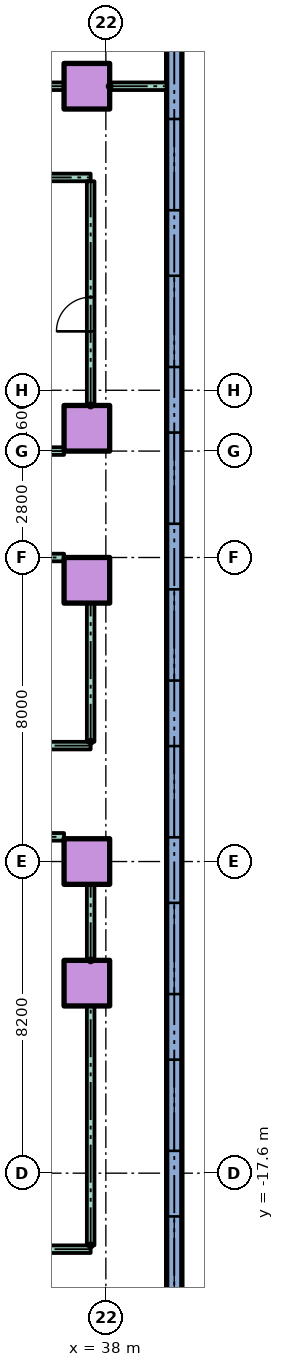
"""IFC4 building model, lengths in metres.
Left out: names, types, materials, properties, quantities, classifications, styles, units other than length and angle.
Written with IfcOpenShell. Run it as: python <this file> out.ifc"""

import sys

from ifc_helpers import new_model, si_unit, direction, frame, frame_2d, origin, origin_2d, place, context, subcontext, project, spatial, rectangle, hollow_rectangle, extrude, element, fill, save


model = new_model("IFC4")
c1 = context("Model", 3, precision=1e-05, world=origin(), true_north=direction((0.0, 1.0)))
c2 = subcontext(c1, "Body", "Model", "MODEL_VIEW")
j1 = project(units=[si_unit("LENGTHUNIT", "METRE"), si_unit("PLANEANGLEUNIT", "RADIAN")], contexts=[c1])
p1 = place(None, origin())
s1 = spatial("IfcSite", under=j1, at=p1, CompositionType="ELEMENT")
p2 = place(p1, origin())
s2 = spatial("IfcBuilding", under=s1, at=p2, CompositionType="ELEMENT")
p3 = place(p2, frame((0.0, 0.0, 18.0)))
s3 = spatial("IfcBuildingStorey", under=s2, at=p3, CompositionType="ELEMENT", Elevation=18.0)
for number, where in (
    (1, (37.5, -12.6, 0.0)),
    (2, (37.5, -9.4, 0.0)),
    (3, (37.5, -2.0, 0.0)),
    (4, (37.5, 2.0, 0.0)),
    (5, (37.5, 11.0, 0.0)),
):
    element("IfcColumn", number, at=place(p3, frame(where)), inside=s3, PredefinedType="COLUMN", context=c2, shape_type="SweptSolid", body=[
        extrude(hollow_rectangle(XDim=1.2, YDim=1.2, WallThickness=0.06, at=origin_2d()), origin(), (0.0, 0.0, 1.0), 4.0),
    ])
p4 = place(p3, frame((39.8, -50.0, 0.0), z_axis=(0.0, 0.0, 1.0), x_axis=(0.0, 1.0, 0.0)))
e6 = element("IfcWall", 6, at=p4, inside=s3, PredefinedType="STANDARD", context=c2, shape_type="SweptSolid", body=[
    extrude(rectangle(XDim=70.0, YDim=0.4, at=frame_2d((35.0, 0.0))), origin(), (0.0, 0.0, 1.0), 3.7),
])
p5 = place(p4, frame((0.75, 0.0, 0.9)))
e7 = element("IfcOpeningElement", 7, at=p5, cuts=e6, PredefinedType="OPENING", context=c2, shape_type="SweptSolid", body=[
    extrude(rectangle(XDim=2.4, YDim=2.1, at=frame_2d((1.2, 1.05))), frame((0.0, 0.21, 0.0), z_axis=(0.0, -1.0, 0.0), x_axis=(1.0, 0.0, 0.0)), (0.0, 0.0, 1.0), 0.42),
])
p6 = place(p4, frame((6.55, 0.0, 0.9)))
e8 = element("IfcOpeningElement", 8, at=p6, cuts=e6, PredefinedType="OPENING", context=c2, shape_type="SweptSolid", body=[
    extrude(rectangle(XDim=2.4, YDim=2.1, at=frame_2d((1.2, 1.05))), frame((0.0, 0.21, 0.0), z_axis=(0.0, -1.0, 0.0), x_axis=(1.0, 0.0, 0.0)), (0.0, 0.0, 1.0), 0.42),
])
p7 = place(p4, frame((10.05, 0.0, 0.9)))
e9 = element("IfcOpeningElement", 9, at=p7, cuts=e6, PredefinedType="OPENING", context=c2, shape_type="SweptSolid", body=[
    extrude(rectangle(XDim=2.4, YDim=2.1, at=frame_2d((1.2, 1.05))), frame((0.0, 0.21, 0.0), z_axis=(0.0, -1.0, 0.0), x_axis=(1.0, 0.0, 0.0)), (0.0, 0.0, 1.0), 0.42),
])
p8 = place(p4, frame((13.55, 0.0, 0.9)))
e10 = element("IfcOpeningElement", 10, at=p8, cuts=e6, PredefinedType="OPENING", context=c2, shape_type="SweptSolid", body=[
    extrude(rectangle(XDim=2.4, YDim=2.1, at=frame_2d((1.2, 1.05))), frame((0.0, 0.21, 0.0), z_axis=(0.0, -1.0, 0.0), x_axis=(1.0, 0.0, 0.0)), (0.0, 0.0, 1.0), 0.42),
])
p9 = place(p4, frame((28.863, 0.0, 0.9)))
e11 = element("IfcOpeningElement", 11, at=p9, cuts=e6, PredefinedType="OPENING", context=c2, shape_type="SweptSolid", body=[
    extrude(rectangle(XDim=2.4, YDim=2.1, at=frame_2d((1.2, 1.05))), frame((0.0, 0.21, 0.0), z_axis=(0.0, -1.0, 0.0), x_axis=(1.0, 0.0, 0.0)), (0.0, 0.0, 1.0), 0.42),
])
p10 = place(p4, frame((32.988, 0.0, 0.9)))
e12 = element("IfcOpeningElement", 12, at=p10, cuts=e6, PredefinedType="OPENING", context=c2, shape_type="SweptSolid", body=[
    extrude(rectangle(XDim=2.4, YDim=2.1, at=frame_2d((1.2, 1.05))), frame((0.0, 0.21, 0.0), z_axis=(0.0, -1.0, 0.0), x_axis=(1.0, 0.0, 0.0)), (0.0, 0.0, 1.0), 0.42),
])
p11 = place(p4, frame((37.113, 0.0, 0.9)))
e13 = element("IfcOpeningElement", 13, at=p11, cuts=e6, PredefinedType="OPENING", context=c2, shape_type="SweptSolid", body=[
    extrude(rectangle(XDim=2.4, YDim=2.1, at=frame_2d((1.2, 1.05))), frame((0.0, 0.21, 0.0), z_axis=(0.0, -1.0, 0.0), x_axis=(1.0, 0.0, 0.0)), (0.0, 0.0, 1.0), 0.42),
])
p12 = place(p4, frame((41.238, 0.0, 0.9)))
e14 = element("IfcOpeningElement", 14, at=p12, cuts=e6, PredefinedType="OPENING", context=c2, shape_type="SweptSolid", body=[
    extrude(rectangle(XDim=2.4, YDim=2.1, at=frame_2d((1.2, 1.05))), frame((0.0, 0.21, 0.0), z_axis=(0.0, -1.0, 0.0), x_axis=(1.0, 0.0, 0.0)), (0.0, 0.0, 1.0), 0.42),
])
p13 = place(p4, frame((45.363, 0.0, 0.9)))
e15 = element("IfcOpeningElement", 15, at=p13, cuts=e6, PredefinedType="OPENING", context=c2, shape_type="SweptSolid", body=[
    extrude(rectangle(XDim=2.4, YDim=2.1, at=frame_2d((1.2, 1.05))), frame((0.0, 0.21, 0.0), z_axis=(0.0, -1.0, 0.0), x_axis=(1.0, 0.0, 0.0)), (0.0, 0.0, 1.0), 0.42),
])
p14 = place(p4, frame((49.488, 0.0, 0.9)))
e16 = element("IfcOpeningElement", 16, at=p14, cuts=e6, PredefinedType="OPENING", context=c2, shape_type="SweptSolid", body=[
    extrude(rectangle(XDim=2.4, YDim=2.1, at=frame_2d((1.2, 1.05))), frame((0.0, 0.21, 0.0), z_axis=(0.0, -1.0, 0.0), x_axis=(1.0, 0.0, 0.0)), (0.0, 0.0, 1.0), 0.42),
])
p15 = place(p4, frame((53.613, 0.0, 0.9)))
e17 = element("IfcOpeningElement", 17, at=p15, cuts=e6, PredefinedType="OPENING", context=c2, shape_type="SweptSolid", body=[
    extrude(rectangle(XDim=2.4, YDim=2.1, at=frame_2d((1.2, 1.05))), frame((0.0, 0.21, 0.0), z_axis=(0.0, -1.0, 0.0), x_axis=(1.0, 0.0, 0.0)), (0.0, 0.0, 1.0), 0.42),
])
p16 = place(p4, frame((57.738, 0.0, 0.9)))
e18 = element("IfcOpeningElement", 18, at=p16, cuts=e6, PredefinedType="OPENING", context=c2, shape_type="SweptSolid", body=[
    extrude(rectangle(XDim=2.4, YDim=2.1, at=frame_2d((1.2, 1.05))), frame((0.0, 0.21, 0.0), z_axis=(0.0, -1.0, 0.0), x_axis=(1.0, 0.0, 0.0)), (0.0, 0.0, 1.0), 0.42),
])
p17 = place(p4, frame((62.05, 0.0, 0.9)))
e19 = element("IfcOpeningElement", 19, at=p17, cuts=e6, PredefinedType="OPENING", context=c2, shape_type="SweptSolid", body=[
    extrude(rectangle(XDim=2.4, YDim=2.1, at=frame_2d((1.2, 1.05))), frame((0.0, 0.21, 0.0), z_axis=(0.0, -1.0, 0.0), x_axis=(1.0, 0.0, 0.0)), (0.0, 0.0, 1.0), 0.42),
])
p18 = place(p4, frame((66.55, 0.0, 0.9)))
e20 = element("IfcOpeningElement", 20, at=p18, cuts=e6, PredefinedType="OPENING", context=c2, shape_type="SweptSolid", body=[
    extrude(rectangle(XDim=2.4, YDim=2.1, at=frame_2d((1.2, 1.05))), frame((0.0, 0.21, 0.0), z_axis=(0.0, -1.0, 0.0), x_axis=(1.0, 0.0, 0.0)), (0.0, 0.0, 1.0), 0.42),
])
p19 = place(p3, frame((-37.6, -19.6, 0.0)))
e21 = element("IfcWall", 21, at=p19, inside=s3, PredefinedType="PARTITIONING", context=c2, shape_type="SweptSolid", body=[
    extrude(rectangle(XDim=75.2, YDim=0.2, at=frame_2d((37.6, 0.0))), origin(), (0.0, 0.0, 1.0), 3.7),
])
p20 = place(p19, frame((2.58, 0.0, 0.0)))
e22 = element("IfcOpeningElement", 22, at=p20, cuts=e21, PredefinedType="OPENING", context=c2, shape_type="SweptSolid", body=[
    extrude(rectangle(XDim=1.0, YDim=2.1, at=frame_2d((0.5, 1.05))), frame((0.0, 0.11, 0.0), z_axis=(0.0, -1.0, 0.0), x_axis=(1.0, 0.0, 0.0)), (0.0, 0.0, 1.0), 0.22),
])
p21 = place(p19, frame((10.42, 0.0, 0.0)))
e23 = element("IfcOpeningElement", 23, at=p21, cuts=e21, PredefinedType="OPENING", context=c2, shape_type="SweptSolid", body=[
    extrude(rectangle(XDim=1.0, YDim=2.1, at=frame_2d((0.5, 1.05))), frame((0.0, 0.11, 0.0), z_axis=(0.0, -1.0, 0.0), x_axis=(1.0, 0.0, 0.0)), (0.0, 0.0, 1.0), 0.22),
])
p22 = place(p19, frame((16.58, 0.0, 0.0)))
e24 = element("IfcOpeningElement", 24, at=p22, cuts=e21, PredefinedType="OPENING", context=c2, shape_type="SweptSolid", body=[
    extrude(rectangle(XDim=1.0, YDim=2.1, at=frame_2d((0.5, 1.05))), frame((0.0, 0.11, 0.0), z_axis=(0.0, -1.0, 0.0), x_axis=(1.0, 0.0, 0.0)), (0.0, 0.0, 1.0), 0.22),
])
p23 = place(p19, frame((24.42, 0.0, 0.0)))
e25 = element("IfcOpeningElement", 25, at=p23, cuts=e21, PredefinedType="OPENING", context=c2, shape_type="SweptSolid", body=[
    extrude(rectangle(XDim=1.0, YDim=2.1, at=frame_2d((0.5, 1.05))), frame((0.0, 0.11, 0.0), z_axis=(0.0, -1.0, 0.0), x_axis=(1.0, 0.0, 0.0)), (0.0, 0.0, 1.0), 0.22),
])
p24 = place(p19, frame((33.0, 0.0, 0.0)))
e26 = element("IfcOpeningElement", 26, at=p24, cuts=e21, PredefinedType="OPENING", context=c2, shape_type="SweptSolid", body=[
    extrude(rectangle(XDim=1.0, YDim=2.1, at=frame_2d((0.5, 1.05))), frame((0.0, 0.11, 0.0), z_axis=(0.0, -1.0, 0.0), x_axis=(1.0, 0.0, 0.0)), (0.0, 0.0, 1.0), 0.22),
])
p25 = place(p19, frame((44.0, 0.0, 0.0)))
e27 = element("IfcOpeningElement", 27, at=p25, cuts=e21, PredefinedType="OPENING", context=c2, shape_type="SweptSolid", body=[
    extrude(rectangle(XDim=1.0, YDim=2.1, at=frame_2d((0.5, 1.05))), frame((0.0, 0.11, 0.0), z_axis=(0.0, -1.0, 0.0), x_axis=(1.0, 0.0, 0.0)), (0.0, 0.0, 1.0), 0.22),
])
p26 = place(p19, frame((55.8, 0.0, 0.0)))
e28 = element("IfcOpeningElement", 28, at=p26, cuts=e21, PredefinedType="OPENING", context=c2, shape_type="SweptSolid", body=[
    extrude(rectangle(XDim=1.0, YDim=2.1, at=frame_2d((0.5, 1.05))), frame((0.0, 0.11, 0.0), z_axis=(0.0, -1.0, 0.0), x_axis=(1.0, 0.0, 0.0)), (0.0, 0.0, 1.0), 0.22),
])
p27 = place(p19, frame((68.45, 0.0, 0.0)))
e29 = element("IfcOpeningElement", 29, at=p27, cuts=e21, PredefinedType="OPENING", context=c2, shape_type="SweptSolid", body=[
    extrude(rectangle(XDim=0.9, YDim=2.1, at=frame_2d((0.45, 1.05))), frame((0.0, 0.11, 0.0), z_axis=(0.0, -1.0, 0.0), x_axis=(1.0, 0.0, 0.0)), (0.0, 0.0, 1.0), 0.22),
])
p28 = place(p3, frame((-36.9, -8.75, 0.0)))
e30 = element("IfcWall", 30, at=p28, inside=s3, PredefinedType="PARTITIONING", context=c2, shape_type="SweptSolid", body=[
    extrude(rectangle(XDim=73.8, YDim=0.2, at=frame_2d((36.9, 0.0))), origin(), (0.0, 0.0, 1.0), 3.7),
])
p29 = place(p3, frame((-37.6, -6.35, 0.0)))
e31 = element("IfcWall", 31, at=p29, inside=s3, PredefinedType="PARTITIONING", context=c2, shape_type="SweptSolid", body=[
    extrude(rectangle(XDim=75.2, YDim=0.2, at=frame_2d((37.6, 0.0))), origin(), (0.0, 0.0, 1.0), 3.7),
])
p30 = place(p29, frame((7.5, 0.0, 0.0)))
e32 = element("IfcOpeningElement", 32, at=p30, cuts=e31, PredefinedType="OPENING", context=c2, shape_type="SweptSolid", body=[
    extrude(rectangle(XDim=1.0, YDim=2.1, at=frame_2d((0.5, 1.05))), frame((0.0, 0.11, 0.0), z_axis=(0.0, -1.0, 0.0), x_axis=(1.0, 0.0, 0.0)), (0.0, 0.0, 1.0), 0.22),
])
p31 = place(p29, frame((20.55, 0.0, 0.0)))
e33 = element("IfcOpeningElement", 33, at=p31, cuts=e31, PredefinedType="OPENING", context=c2, shape_type="SweptSolid", body=[
    extrude(rectangle(XDim=0.9, YDim=2.1, at=frame_2d((0.45, 1.05))), frame((0.0, 0.11, 0.0), z_axis=(0.0, -1.0, 0.0), x_axis=(1.0, 0.0, 0.0)), (0.0, 0.0, 1.0), 0.22),
])
p32 = place(p29, frame((30.55, 0.0, 0.0)))
e34 = element("IfcOpeningElement", 34, at=p32, cuts=e31, PredefinedType="OPENING", context=c2, shape_type="SweptSolid", body=[
    extrude(rectangle(XDim=0.9, YDim=2.1, at=frame_2d((0.45, 1.05))), frame((0.0, 0.11, 0.0), z_axis=(0.0, -1.0, 0.0), x_axis=(1.0, 0.0, 0.0)), (0.0, 0.0, 1.0), 0.22),
])
p33 = place(p29, frame((41.5, 0.0, 0.0)))
e35 = element("IfcOpeningElement", 35, at=p33, cuts=e31, PredefinedType="OPENING", context=c2, shape_type="SweptSolid", body=[
    extrude(rectangle(XDim=1.0, YDim=2.1, at=frame_2d((0.5, 1.05))), frame((0.0, 0.11, 0.0), z_axis=(0.0, -1.0, 0.0), x_axis=(1.0, 0.0, 0.0)), (0.0, 0.0, 1.0), 0.22),
])
p34 = place(p29, frame((61.1, 0.0, 0.0)))
e36 = element("IfcOpeningElement", 36, at=p34, cuts=e31, PredefinedType="OPENING", context=c2, shape_type="SweptSolid", body=[
    extrude(rectangle(XDim=1.0, YDim=2.1, at=frame_2d((0.5, 1.05))), frame((0.0, 0.11, 0.0), z_axis=(0.0, -1.0, 0.0), x_axis=(1.0, 0.0, 0.0)), (0.0, 0.0, 1.0), 0.22),
])
p35 = place(p3, frame((14.0, -1.4, 0.0)))
e37 = element("IfcWall", 37, at=p35, inside=s3, PredefinedType="PARTITIONING", context=c2, shape_type="SweptSolid", body=[
    extrude(rectangle(XDim=22.9, YDim=0.2, at=frame_2d((11.45, 0.0))), origin(), (0.0, 0.0, 1.0), 3.7),
])
p36 = place(p3, frame((16.3, 1.4, 0.0)))
e38 = element("IfcWall", 38, at=p36, inside=s3, PredefinedType="PARTITIONING", context=c2, shape_type="SweptSolid", body=[
    extrude(rectangle(XDim=20.6, YDim=0.2, at=frame_2d((10.3, 0.0))), origin(), (0.0, 0.0, 1.0), 3.7),
])
p37 = place(p36, frame((8.05, 0.0, 0.0)))
e39 = element("IfcOpeningElement", 39, at=p37, cuts=e38, PredefinedType="OPENING", context=c2, shape_type="SweptSolid", body=[
    extrude(rectangle(XDim=1.0, YDim=2.1, at=frame_2d((0.5, 1.05))), frame((0.0, 0.11, 0.0), z_axis=(0.0, -1.0, 0.0), x_axis=(1.0, 0.0, 0.0)), (0.0, 0.0, 1.0), 0.22),
])
p38 = place(p36, frame((12.4, 0.0, 0.0)))
e40 = element("IfcOpeningElement", 40, at=p38, cuts=e38, PredefinedType="OPENING", context=c2, shape_type="SweptSolid", body=[
    extrude(rectangle(XDim=1.0, YDim=2.1, at=frame_2d((0.5, 1.05))), frame((0.0, 0.11, 0.0), z_axis=(0.0, -1.0, 0.0), x_axis=(1.0, 0.0, 0.0)), (0.0, 0.0, 1.0), 0.22),
])
p39 = place(p36, frame((16.05, 0.0, 0.0)))
e41 = element("IfcOpeningElement", 41, at=p39, cuts=e38, PredefinedType="OPENING", context=c2, shape_type="SweptSolid", body=[
    extrude(rectangle(XDim=1.0, YDim=2.1, at=frame_2d((0.5, 1.05))), frame((0.0, 0.11, 0.0), z_axis=(0.0, -1.0, 0.0), x_axis=(1.0, 0.0, 0.0)), (0.0, 0.0, 1.0), 0.22),
])
p40 = place(p3, frame((16.3, 8.6, 0.0)))
e42 = element("IfcWall", 42, at=p40, inside=s3, PredefinedType="PARTITIONING", context=c2, shape_type="SweptSolid", body=[
    extrude(rectangle(XDim=21.3, YDim=0.2, at=frame_2d((10.65, 0.0))), origin(), (0.0, 0.0, 1.0), 3.7),
])
p41 = place(p3, frame((34.5, 11.0, 0.0)))
e43 = element("IfcWall", 43, at=p41, inside=s3, PredefinedType="PARTITIONING", context=c2, shape_type="SweptSolid", body=[
    extrude(rectangle(XDim=2.4, YDim=0.2, at=frame_2d((1.2, 0.0))), origin(), (0.0, 0.0, 1.0), 3.7),
])
p42 = place(p3, frame((38.1, 11.0, 0.0)))
e44 = element("IfcWall", 44, at=p42, inside=s3, PredefinedType="PARTITIONING", context=c2, shape_type="SweptSolid", body=[
    extrude(rectangle(XDim=1.5, YDim=0.2, at=frame_2d((0.75, 0.0))), origin(), (0.0, 0.0, 1.0), 3.7),
])
p43 = place(p3, frame((37.6, -19.5, 0.0), z_axis=(0.0, 0.0, 1.0), x_axis=(0.0, 1.0, 0.0)))
e45 = element("IfcWall", 45, at=p43, inside=s3, PredefinedType="PARTITIONING", context=c2, shape_type="SweptSolid", body=[
    extrude(rectangle(XDim=6.3, YDim=0.2, at=frame_2d((3.15, 0.0))), origin(), (0.0, 0.0, 1.0), 3.7),
])
p44 = place(p3, frame((37.6, -12.0, 0.0), z_axis=(0.0, 0.0, 1.0), x_axis=(0.0, 1.0, 0.0)))
e46 = element("IfcWall", 46, at=p44, inside=s3, PredefinedType="PARTITIONING", context=c2, shape_type="SweptSolid", body=[
    extrude(rectangle(XDim=2.0, YDim=0.2, at=frame_2d((1.0, 0.0))), origin(), (0.0, 0.0, 1.0), 3.7),
])
p45 = place(p3, frame((37.6, -6.25, 0.0), z_axis=(0.0, 0.0, 1.0), x_axis=(0.0, 1.0, 0.0)))
e47 = element("IfcWall", 47, at=p45, inside=s3, PredefinedType="PARTITIONING", context=c2, shape_type="SweptSolid", body=[
    extrude(rectangle(XDim=3.65, YDim=0.2, at=frame_2d((1.825, 0.0))), origin(), (0.0, 0.0, 1.0), 3.7),
])
p46 = place(p3, frame((37.6, 2.6, 0.0), z_axis=(0.0, 0.0, 1.0), x_axis=(0.0, 1.0, 0.0)))
e48 = element("IfcWall", 48, at=p46, inside=s3, PredefinedType="PARTITIONING", context=c2, shape_type="SweptSolid", body=[
    extrude(rectangle(XDim=5.9, YDim=0.2, at=frame_2d((2.95, 0.0))), origin(), (0.0, 0.0, 1.0), 3.7),
])
p47 = place(p46, frame((1.95, 0.0, 0.0)))
e49 = element("IfcOpeningElement", 49, at=p47, cuts=e48, PredefinedType="OPENING", context=c2, shape_type="SweptSolid", body=[
    extrude(rectangle(XDim=0.9, YDim=2.1, at=frame_2d((0.45, 1.05))), frame((0.0, 0.11, 0.0), z_axis=(0.0, -1.0, 0.0), x_axis=(1.0, 0.0, 0.0)), (0.0, 0.0, 1.0), 0.22),
])
p48 = place(p9, origin())
e50 = element("IfcWindow", 50, at=p48, inside=s3, PartitioningType="SINGLE_PANEL", PredefinedType="WINDOW", context=c2, shape_type="SweptSolid", body=[
    extrude(rectangle(XDim=2.4, YDim=2.1, at=frame_2d((1.2, 1.05))), frame((0.0, 0.03, 0.0), z_axis=(0.0, -1.0, 0.0), x_axis=(1.0, 0.0, 0.0)), (0.0, 0.0, 1.0), 0.06),
])
fill(e11, e50)
p49 = place(p10, origin())
e51 = element("IfcWindow", 51, at=p49, inside=s3, PartitioningType="SINGLE_PANEL", PredefinedType="WINDOW", context=c2, shape_type="SweptSolid", body=[
    extrude(rectangle(XDim=2.4, YDim=2.1, at=frame_2d((1.2, 1.05))), frame((0.0, 0.03, 0.0), z_axis=(0.0, -1.0, 0.0), x_axis=(1.0, 0.0, 0.0)), (0.0, 0.0, 1.0), 0.06),
])
fill(e12, e51)
p50 = place(p11, origin())
e52 = element("IfcWindow", 52, at=p50, inside=s3, PartitioningType="SINGLE_PANEL", PredefinedType="WINDOW", context=c2, shape_type="SweptSolid", body=[
    extrude(rectangle(XDim=2.4, YDim=2.1, at=frame_2d((1.2, 1.05))), frame((0.0, 0.03, 0.0), z_axis=(0.0, -1.0, 0.0), x_axis=(1.0, 0.0, 0.0)), (0.0, 0.0, 1.0), 0.06),
])
fill(e13, e52)
p51 = place(p12, origin())
e53 = element("IfcWindow", 53, at=p51, inside=s3, PartitioningType="SINGLE_PANEL", PredefinedType="WINDOW", context=c2, shape_type="SweptSolid", body=[
    extrude(rectangle(XDim=2.4, YDim=2.1, at=frame_2d((1.2, 1.05))), frame((0.0, 0.03, 0.0), z_axis=(0.0, -1.0, 0.0), x_axis=(1.0, 0.0, 0.0)), (0.0, 0.0, 1.0), 0.06),
])
fill(e14, e53)
p52 = place(p13, origin())
e54 = element("IfcWindow", 54, at=p52, inside=s3, PartitioningType="SINGLE_PANEL", PredefinedType="WINDOW", context=c2, shape_type="SweptSolid", body=[
    extrude(rectangle(XDim=2.4, YDim=2.1, at=frame_2d((1.2, 1.05))), frame((0.0, 0.03, 0.0), z_axis=(0.0, -1.0, 0.0), x_axis=(1.0, 0.0, 0.0)), (0.0, 0.0, 1.0), 0.06),
])
fill(e15, e54)
p53 = place(p14, origin())
e55 = element("IfcWindow", 55, at=p53, inside=s3, PartitioningType="SINGLE_PANEL", PredefinedType="WINDOW", context=c2, shape_type="SweptSolid", body=[
    extrude(rectangle(XDim=2.4, YDim=2.1, at=frame_2d((1.2, 1.05))), frame((0.0, 0.03, 0.0), z_axis=(0.0, -1.0, 0.0), x_axis=(1.0, 0.0, 0.0)), (0.0, 0.0, 1.0), 0.06),
])
fill(e16, e55)
p54 = place(p15, origin())
e56 = element("IfcWindow", 56, at=p54, inside=s3, PartitioningType="SINGLE_PANEL", PredefinedType="WINDOW", context=c2, shape_type="SweptSolid", body=[
    extrude(rectangle(XDim=2.4, YDim=2.1, at=frame_2d((1.2, 1.05))), frame((0.0, 0.03, 0.0), z_axis=(0.0, -1.0, 0.0), x_axis=(1.0, 0.0, 0.0)), (0.0, 0.0, 1.0), 0.06),
])
fill(e17, e56)
p55 = place(p16, origin())
e57 = element("IfcWindow", 57, at=p55, inside=s3, PartitioningType="SINGLE_PANEL", PredefinedType="WINDOW", context=c2, shape_type="SweptSolid", body=[
    extrude(rectangle(XDim=2.4, YDim=2.1, at=frame_2d((1.2, 1.05))), frame((0.0, 0.03, 0.0), z_axis=(0.0, -1.0, 0.0), x_axis=(1.0, 0.0, 0.0)), (0.0, 0.0, 1.0), 0.06),
])
fill(e18, e57)
p56 = place(p47, origin())
e58 = element("IfcDoor", 58, at=p56, inside=s3, OperationType="SINGLE_SWING_LEFT", PredefinedType="DOOR", context=c2, shape_type="SweptSolid", body=[
    extrude(rectangle(XDim=0.9, YDim=2.1, at=frame_2d((0.45, 1.05))), frame((0.0, 0.025, 0.0), z_axis=(0.0, -1.0, 0.0), x_axis=(1.0, 0.0, 0.0)), (0.0, 0.0, 1.0), 0.05),
])
fill(e49, e58)
save(model, sys.argv[1])
